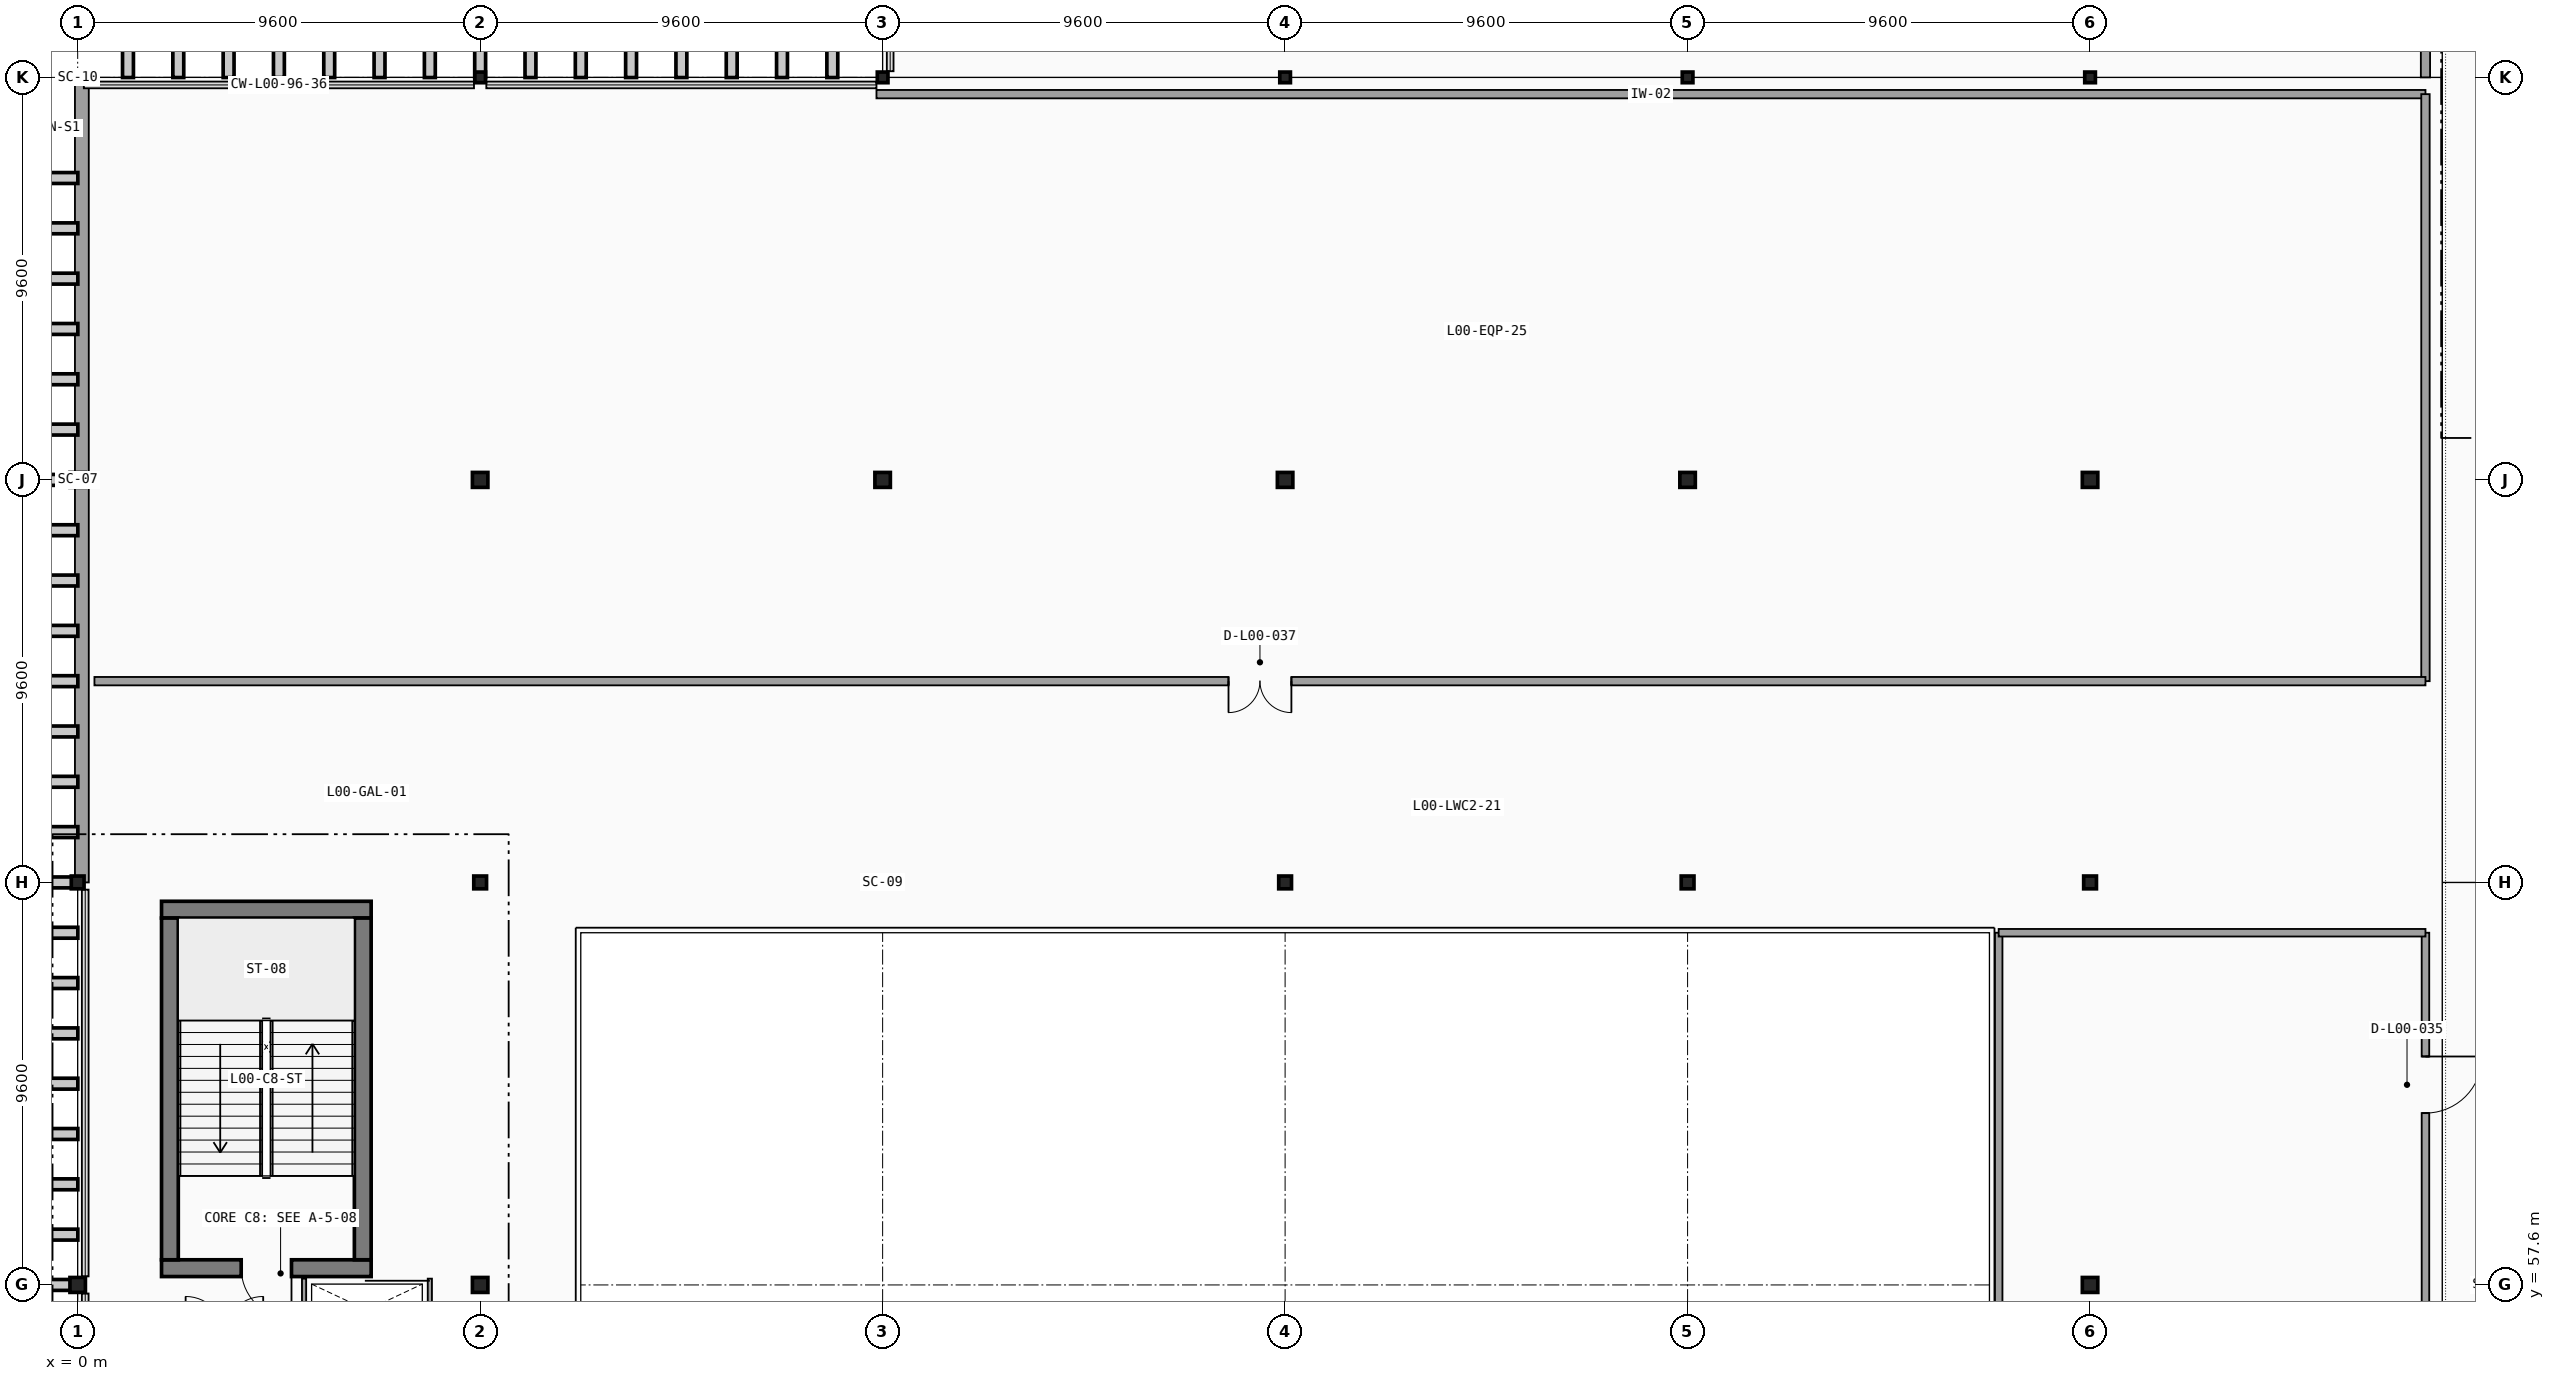
"""IFC4 building model, lengths in metres.
Left out: names, types, materials, properties, quantities, classifications, styles, units other than length and angle.
Written with IfcOpenShell. Run it as: python <this file> out.ifc"""

import sys

from ifc_helpers import new_model, si_unit, direction, frame, frame_2d, origin, origin_2d, place, context, subcontext, project, spatial, rectangle, hollow_rectangle, i_section, extrude, element, fill, save


model = new_model("IFC4")
c1 = context("Model", 3, precision=1e-05, world=origin(), true_north=direction((0.0, 1.0)))
c2 = subcontext(c1, "Body", "Model", "MODEL_VIEW")
j1 = project(units=[si_unit("LENGTHUNIT", "METRE"), si_unit("PLANEANGLEUNIT", "RADIAN")], contexts=[c1])
p1 = place(None, origin())
s1 = spatial("IfcSite", under=j1, at=p1, CompositionType="ELEMENT")
p2 = place(p1, origin())
s2 = spatial("IfcBuilding", under=s1, at=p2, CompositionType="ELEMENT")
p3 = place(p2, origin())
s3 = spatial("IfcBuildingStorey", under=s2, at=p3, CompositionType="ELEMENT", Elevation=0.0)
p4 = place(p3, frame((0.0, 57.6, 0.0), z_axis=(0.0, 0.0, 1.0), x_axis=(1.0, 0.0, 0.0)))
e1 = element("IfcColumn", 1, at=p4, inside=s3, PredefinedType="COLUMN", context=c2, shape_type="SweptSolid", body=[
    extrude(i_section(OverallWidth=0.369, OverallDepth=0.356, WebThickness=0.011, FlangeThickness=0.018, FilletRadius=0.015, at=origin_2d()), origin(), (0.0, 0.0, 1.0), 4.8),
])
p5 = place(p3, frame((0.0, 67.2, 0.0), z_axis=(0.0, 0.0, 1.0), x_axis=(1.0, 0.0, 0.0)))
e2 = element("IfcColumn", 2, at=p5, inside=s3, PredefinedType="COLUMN", context=c2, shape_type="SweptSolid", body=[
    extrude(hollow_rectangle(XDim=0.305, YDim=0.305, WallThickness=0.013, InnerFilletRadius=0.013, OuterFilletRadius=0.025, at=origin_2d()), origin(), (0.0, 0.0, 1.0), 4.8),
])
p6 = place(p3, frame((0.0, 76.8, 0.0), z_axis=(0.0, 0.0, 1.0), x_axis=(1.0, 0.0, 0.0)))
e3 = element("IfcColumn", 3, at=p6, inside=s3, PredefinedType="COLUMN", context=c2, shape_type="SweptSolid", body=[
    extrude(i_section(OverallWidth=0.369, OverallDepth=0.356, WebThickness=0.011, FlangeThickness=0.018, FilletRadius=0.015, at=origin_2d()), origin(), (0.0, 0.0, 1.0), 4.8),
])
p7 = place(p3, frame((0.0, 86.4, 0.0), z_axis=(0.0, 0.0, 1.0), x_axis=(1.0, 0.0, 0.0)))
e4 = element("IfcColumn", 4, at=p7, inside=s3, PredefinedType="COLUMN", context=c2, shape_type="SweptSolid", body=[
    extrude(hollow_rectangle(XDim=0.254, YDim=0.254, WallThickness=0.013, InnerFilletRadius=0.013, OuterFilletRadius=0.025, at=origin_2d()), origin(), (0.0, 0.0, 1.0), 4.8),
])
p8 = place(p3, frame((9.6, 57.6, 0.0), z_axis=(0.0, 0.0, 1.0), x_axis=(1.0, 0.0, 0.0)))
e5 = element("IfcColumn", 5, at=p8, inside=s3, PredefinedType="COLUMN", context=c2, shape_type="SweptSolid", body=[
    extrude(i_section(OverallWidth=0.369, OverallDepth=0.356, WebThickness=0.011, FlangeThickness=0.018, FilletRadius=0.015, at=origin_2d()), origin(), (0.0, 0.0, 1.0), 4.8),
])
p9 = place(p3, frame((9.6, 67.2, 0.0), z_axis=(0.0, 0.0, 1.0), x_axis=(1.0, 0.0, 0.0)))
e6 = element("IfcColumn", 6, at=p9, inside=s3, PredefinedType="COLUMN", context=c2, shape_type="SweptSolid", body=[
    extrude(hollow_rectangle(XDim=0.305, YDim=0.305, WallThickness=0.013, InnerFilletRadius=0.013, OuterFilletRadius=0.025, at=origin_2d()), origin(), (0.0, 0.0, 1.0), 4.8),
])
p10 = place(p3, frame((9.6, 76.8, 0.0), z_axis=(0.0, 0.0, 1.0), x_axis=(1.0, 0.0, 0.0)))
e7 = element("IfcColumn", 7, at=p10, inside=s3, PredefinedType="COLUMN", context=c2, shape_type="SweptSolid", body=[
    extrude(i_section(OverallWidth=0.369, OverallDepth=0.356, WebThickness=0.011, FlangeThickness=0.018, FilletRadius=0.015, at=origin_2d()), origin(), (0.0, 0.0, 1.0), 4.8),
])
p11 = place(p3, frame((9.6, 86.4, 0.0), z_axis=(0.0, 0.0, 1.0), x_axis=(1.0, 0.0, 0.0)))
e8 = element("IfcColumn", 8, at=p11, inside=s3, PredefinedType="COLUMN", context=c2, shape_type="SweptSolid", body=[
    extrude(hollow_rectangle(XDim=0.254, YDim=0.254, WallThickness=0.013, InnerFilletRadius=0.013, OuterFilletRadius=0.025, at=origin_2d()), origin(), (0.0, 0.0, 1.0), 4.8),
])
p12 = place(p3, frame((19.2, 67.2, 0.0), z_axis=(0.0, 0.0, 1.0), x_axis=(1.0, 0.0, 0.0)))
e9 = element("IfcColumn", 9, at=p12, inside=s3, PredefinedType="COLUMN", context=c2, shape_type="SweptSolid", body=[
    extrude(hollow_rectangle(XDim=0.305, YDim=0.305, WallThickness=0.013, InnerFilletRadius=0.013, OuterFilletRadius=0.025, at=origin_2d()), origin(), (0.0, 0.0, 1.0), 4.8),
])
p13 = place(p3, frame((19.2, 76.8, 0.0), z_axis=(0.0, 0.0, 1.0), x_axis=(1.0, 0.0, 0.0)))
e10 = element("IfcColumn", 10, at=p13, inside=s3, PredefinedType="COLUMN", context=c2, shape_type="SweptSolid", body=[
    extrude(i_section(OverallWidth=0.369, OverallDepth=0.356, WebThickness=0.011, FlangeThickness=0.018, FilletRadius=0.015, at=origin_2d()), origin(), (0.0, 0.0, 1.0), 4.8),
])
p14 = place(p3, frame((19.2, 86.4, 0.0), z_axis=(0.0, 0.0, 1.0), x_axis=(1.0, 0.0, 0.0)))
e11 = element("IfcColumn", 11, at=p14, inside=s3, PredefinedType="COLUMN", context=c2, shape_type="SweptSolid", body=[
    extrude(hollow_rectangle(XDim=0.254, YDim=0.254, WallThickness=0.013, InnerFilletRadius=0.013, OuterFilletRadius=0.025, at=origin_2d()), origin(), (0.0, 0.0, 1.0), 4.8),
])
p15 = place(p3, frame((28.8, 67.2, 0.0), z_axis=(0.0, 0.0, 1.0), x_axis=(1.0, 0.0, 0.0)))
e12 = element("IfcColumn", 12, at=p15, inside=s3, PredefinedType="COLUMN", context=c2, shape_type="SweptSolid", body=[
    extrude(hollow_rectangle(XDim=0.305, YDim=0.305, WallThickness=0.013, InnerFilletRadius=0.013, OuterFilletRadius=0.025, at=origin_2d()), origin(), (0.0, 0.0, 1.0), 4.8),
])
p16 = place(p3, frame((28.8, 76.8, 0.0), z_axis=(0.0, 0.0, 1.0), x_axis=(1.0, 0.0, 0.0)))
e13 = element("IfcColumn", 13, at=p16, inside=s3, PredefinedType="COLUMN", context=c2, shape_type="SweptSolid", body=[
    extrude(i_section(OverallWidth=0.369, OverallDepth=0.356, WebThickness=0.011, FlangeThickness=0.018, FilletRadius=0.015, at=origin_2d()), origin(), (0.0, 0.0, 1.0), 4.8),
])
p17 = place(p3, frame((28.8, 86.4, 0.0), z_axis=(0.0, 0.0, 1.0), x_axis=(1.0, 0.0, 0.0)))
e14 = element("IfcColumn", 14, at=p17, inside=s3, PredefinedType="COLUMN", context=c2, shape_type="SweptSolid", body=[
    extrude(hollow_rectangle(XDim=0.254, YDim=0.254, WallThickness=0.013, InnerFilletRadius=0.013, OuterFilletRadius=0.025, at=origin_2d()), origin(), (0.0, 0.0, 1.0), 4.8),
])
p18 = place(p3, frame((38.4, 67.2, 0.0), z_axis=(0.0, 0.0, 1.0), x_axis=(1.0, 0.0, 0.0)))
e15 = element("IfcColumn", 15, at=p18, inside=s3, PredefinedType="COLUMN", context=c2, shape_type="SweptSolid", body=[
    extrude(hollow_rectangle(XDim=0.305, YDim=0.305, WallThickness=0.013, InnerFilletRadius=0.013, OuterFilletRadius=0.025, at=origin_2d()), origin(), (0.0, 0.0, 1.0), 4.8),
])
p19 = place(p3, frame((38.4, 76.8, 0.0), z_axis=(0.0, 0.0, 1.0), x_axis=(1.0, 0.0, 0.0)))
e16 = element("IfcColumn", 16, at=p19, inside=s3, PredefinedType="COLUMN", context=c2, shape_type="SweptSolid", body=[
    extrude(i_section(OverallWidth=0.369, OverallDepth=0.356, WebThickness=0.011, FlangeThickness=0.018, FilletRadius=0.015, at=origin_2d()), origin(), (0.0, 0.0, 1.0), 4.8),
])
p20 = place(p3, frame((38.4, 86.4, 0.0), z_axis=(0.0, 0.0, 1.0), x_axis=(1.0, 0.0, 0.0)))
e17 = element("IfcColumn", 17, at=p20, inside=s3, PredefinedType="COLUMN", context=c2, shape_type="SweptSolid", body=[
    extrude(hollow_rectangle(XDim=0.254, YDim=0.254, WallThickness=0.013, InnerFilletRadius=0.013, OuterFilletRadius=0.025, at=origin_2d()), origin(), (0.0, 0.0, 1.0), 4.8),
])
p21 = place(p3, frame((48.0, 57.6, 0.0), z_axis=(0.0, 0.0, 1.0), x_axis=(1.0, 0.0, 0.0)))
e18 = element("IfcColumn", 18, at=p21, inside=s3, PredefinedType="COLUMN", context=c2, shape_type="SweptSolid", body=[
    extrude(i_section(OverallWidth=0.369, OverallDepth=0.356, WebThickness=0.011, FlangeThickness=0.018, FilletRadius=0.015, at=origin_2d()), origin(), (0.0, 0.0, 1.0), 4.8),
])
p22 = place(p3, frame((48.0, 67.2, 0.0), z_axis=(0.0, 0.0, 1.0), x_axis=(1.0, 0.0, 0.0)))
e19 = element("IfcColumn", 19, at=p22, inside=s3, PredefinedType="COLUMN", context=c2, shape_type="SweptSolid", body=[
    extrude(hollow_rectangle(XDim=0.305, YDim=0.305, WallThickness=0.013, InnerFilletRadius=0.013, OuterFilletRadius=0.025, at=origin_2d()), origin(), (0.0, 0.0, 1.0), 4.8),
])
p23 = place(p3, frame((48.0, 76.8, 0.0), z_axis=(0.0, 0.0, 1.0), x_axis=(1.0, 0.0, 0.0)))
e20 = element("IfcColumn", 20, at=p23, inside=s3, PredefinedType="COLUMN", context=c2, shape_type="SweptSolid", body=[
    extrude(i_section(OverallWidth=0.369, OverallDepth=0.356, WebThickness=0.011, FlangeThickness=0.018, FilletRadius=0.015, at=origin_2d()), origin(), (0.0, 0.0, 1.0), 4.8),
])
p24 = place(p3, frame((48.0, 86.4, 0.0), z_axis=(0.0, 0.0, 1.0), x_axis=(1.0, 0.0, 0.0)))
e21 = element("IfcColumn", 21, at=p24, inside=s3, PredefinedType="COLUMN", context=c2, shape_type="SweptSolid", body=[
    extrude(hollow_rectangle(XDim=0.254, YDim=0.254, WallThickness=0.013, InnerFilletRadius=0.013, OuterFilletRadius=0.025, at=origin_2d()), origin(), (0.0, 0.0, 1.0), 4.8),
])
p25 = place(p3, frame((0.1, 86.4, 0.0), z_axis=(0.0, 0.0, 1.0), x_axis=(0.0, -1.0, 0.0)))
e22 = element("IfcWall", 22, at=p25, inside=s3, PredefinedType="SOLIDWALL", context=c2, shape_type="SweptSolid", body=[
    extrude(rectangle(XDim=9.6, YDim=0.33, at=frame_2d((4.8, 0.0))), origin(), (0.0, 0.0, 1.0), 3.573),
])
p26 = place(p3, frame((0.1, 76.8, 0.0), z_axis=(0.0, 0.0, 1.0), x_axis=(0.0, -1.0, 0.0)))
e23 = element("IfcWall", 23, at=p26, inside=s3, PredefinedType="SOLIDWALL", context=c2, shape_type="SweptSolid", body=[
    extrude(rectangle(XDim=9.6, YDim=0.33, at=frame_2d((4.8, 0.0))), origin(), (0.0, 0.0, 1.0), 3.573),
])
p27 = place(p3, frame((2.0, 58.0, 0.0), z_axis=(0.0, 0.0, 1.0), x_axis=(1.0, 0.0, 0.0)))
e24 = element("IfcWall", 24, at=p27, inside=s3, PredefinedType="SHEAR", context=c2, shape_type="SweptSolid", body=[
    extrude(rectangle(XDim=5.0, YDim=0.4, at=frame_2d((2.5, 0.0))), origin(), (0.0, 0.0, 1.0), 4.5),
])
p28 = place(p27, frame((3.1, 0.0, 0.0), z_axis=(0.0, 0.0, 1.0), x_axis=(-1.0, 0.0, 0.0)))
e25 = element("IfcOpeningElement", 25, at=p28, cuts=e24, PredefinedType="OPENING", context=c2, shape_type="SweptSolid", body=[
    extrude(rectangle(XDim=1.2, YDim=2.2, at=frame_2d((0.6, 1.1))), frame((0.0, 0.21, 0.0), z_axis=(0.0, -1.0, 0.0), x_axis=(1.0, 0.0, 0.0)), (0.0, 0.0, 1.0), 0.42),
])
p29 = place(p3, frame((7.0, 66.55, 0.0), z_axis=(0.0, 0.0, 1.0), x_axis=(-1.0, 0.0, 0.0)))
e26 = element("IfcWall", 26, at=p29, inside=s3, PredefinedType="SHEAR", context=c2, shape_type="SweptSolid", body=[
    extrude(rectangle(XDim=5.0, YDim=0.4, at=frame_2d((2.5, 0.0))), origin(), (0.0, 0.0, 1.0), 4.5),
])
for number, where, z_axis, x_axis in (
    (27, (2.2, 66.35, 0.0), (0.0, 0.0, 1.0), (0.0, -1.0, 0.0)),
    (28, (6.8, 58.2, 0.0), (0.0, 0.0, 1.0), (0.0, 1.0, 0.0)),
):
    element("IfcWall", number, at=place(p3, frame(where, z_axis=z_axis, x_axis=x_axis)), inside=s3, PredefinedType="SHEAR", context=c2, shape_type="SweptSolid", body=[
        extrude(rectangle(XDim=8.15, YDim=0.4, at=frame_2d((4.075, 0.0))), origin(), (0.0, 0.0, 1.0), 4.5),
    ])
for number, where, z_axis, x_axis in (
    (29, (5.4, 57.75, 0.0), (0.0, 0.0, 1.0), (0.0, -1.0, 0.0)),
    (30, (8.4, 56.25, 0.0), (0.0, 0.0, 1.0), (0.0, 1.0, 0.0)),
):
    element("IfcWall", number, at=place(p3, frame(where, z_axis=z_axis, x_axis=x_axis)), inside=s3, PredefinedType="PARTITIONING", context=c2, shape_type="SweptSolid", body=[
        extrude(rectangle(XDim=1.5, YDim=0.1, at=frame_2d((0.75, 0.0))), origin(), (0.0, 0.0, 1.0), 4.5),
    ])
p30 = place(p3, frame((56.0, 66.0, 0.0), z_axis=(0.0, 0.0, 1.0), x_axis=(0.0, -1.0, 0.0)))
e31 = element("IfcWall", 31, at=p30, inside=s3, PredefinedType="PARTITIONING", context=c2, shape_type="SweptSolid", body=[
    extrude(rectangle(XDim=27.4, YDim=0.18, at=frame_2d((13.7, 0.0))), origin(), (0.0, 0.0, 1.0), 3.664),
])
p31 = place(p30, frame((2.952, 0.0, 0.0), z_axis=(0.0, 0.0, 1.0), x_axis=(1.0, 0.0, 0.0)))
e32 = element("IfcOpeningElement", 32, at=p31, cuts=e31, PredefinedType="OPENING", context=c2, shape_type="SweptSolid", body=[
    extrude(rectangle(XDim=1.35, YDim=2.25, at=frame_2d((0.675, 1.125))), frame((0.0, 0.1, 0.0), z_axis=(0.0, -1.0, 0.0), x_axis=(1.0, 0.0, 0.0)), (0.0, 0.0, 1.0), 0.2),
])
p32 = place(p3, frame((45.82, 38.6, 0.0), z_axis=(0.0, 0.0, 1.0), x_axis=(0.0, 1.0, 0.0)))
e33 = element("IfcWall", 33, at=p32, inside=s3, PredefinedType="PARTITIONING", context=c2, shape_type="SweptSolid", body=[
    extrude(rectangle(XDim=27.4, YDim=0.18, at=frame_2d((13.7, 0.0))), origin(), (0.0, 0.0, 1.0), 4.5),
])
p33 = place(p3, frame((45.82, 66.0, 0.0), z_axis=(0.0, 0.0, 1.0), x_axis=(1.0, 0.0, 0.0)))
e34 = element("IfcWall", 34, at=p33, inside=s3, PredefinedType="PARTITIONING", context=c2, shape_type="SweptSolid", body=[
    extrude(rectangle(XDim=10.18, YDim=0.18, at=frame_2d((5.09, 0.0))), origin(), (0.0, 0.0, 1.0), 3.738),
])
p34 = place(p3, frame((19.053, 86.0, 0.0), z_axis=(0.0, 0.0, 1.0), x_axis=(1.0, 0.0, 0.0)))
e35 = element("IfcWall", 35, at=p34, inside=s3, PredefinedType="PARTITIONING", context=c2, shape_type="SweptSolid", body=[
    extrude(rectangle(XDim=36.947, YDim=0.2, at=frame_2d((18.474, 0.0))), origin(), (0.0, 0.0, 1.0), 3.738),
])
p35 = place(p3, frame((56.0, 86.0, 0.0), z_axis=(0.0, 0.0, 1.0), x_axis=(0.0, -1.0, 0.0)))
e36 = element("IfcWall", 36, at=p35, inside=s3, PredefinedType="PARTITIONING", context=c2, shape_type="SweptSolid", body=[
    extrude(rectangle(XDim=14.0, YDim=0.2, at=frame_2d((7.0, 0.0))), origin(), (0.0, 0.0, 1.0), 3.664),
])
p36 = place(p3, frame((56.0, 72.0, 0.0), z_axis=(0.0, 0.0, 1.0), x_axis=(-1.0, 0.0, 0.0)))
e37 = element("IfcWall", 37, at=p36, inside=s3, PredefinedType="PARTITIONING", context=c2, shape_type="SweptSolid", body=[
    extrude(rectangle(XDim=55.6, YDim=0.2, at=frame_2d((27.8, 0.0))), origin(), (0.0, 0.0, 1.0), 3.738),
])
p37 = place(p36, frame((27.05, 0.0, 0.0), z_axis=(0.0, 0.0, 1.0), x_axis=(1.0, 0.0, 0.0)))
e38 = element("IfcOpeningElement", 38, at=p37, cuts=e37, PredefinedType="OPENING", context=c2, shape_type="SweptSolid", body=[
    extrude(rectangle(XDim=1.5, YDim=2.25, at=frame_2d((0.75, 1.125))), frame((0.0, 0.11, 0.0), z_axis=(0.0, -1.0, 0.0), x_axis=(1.0, 0.0, 0.0)), (0.0, 0.0, 1.0), 0.22),
])
p38 = place(p3, frame((56.0, 105.2, 0.0), z_axis=(0.0, 0.0, 1.0), x_axis=(0.0, -1.0, 0.0)))
e39 = element("IfcWall", 39, at=p38, inside=s3, PredefinedType="PARTITIONING", context=c2, shape_type="SweptSolid", body=[
    extrude(rectangle(XDim=18.8, YDim=0.22, at=frame_2d((9.4, 0.0))), origin(), (0.0, 0.0, 1.0), 3.664),
])
p39 = place(p38, frame((13.025, 0.0, 0.0), z_axis=(0.0, 0.0, 1.0), x_axis=(1.0, 0.0, 0.0)))
e40 = element("IfcOpeningElement", 40, at=p39, cuts=e39, PredefinedType="OPENING", context=c2, shape_type="SweptSolid", body=[
    extrude(rectangle(XDim=1.95, YDim=2.35, at=frame_2d((0.975, 1.175))), frame((0.0, 0.12, 0.0), z_axis=(0.0, -1.0, 0.0), x_axis=(1.0, 0.0, 0.0)), (0.0, 0.0, 1.0), 0.24),
])
p40 = place(p28, origin())
e41 = element("IfcDoor", 41, at=p40, inside=s3, OperationType="SINGLE_SWING_LEFT", PredefinedType="DOOR", context=c2, shape_type="SweptSolid", body=[
    extrude(rectangle(XDim=1.2, YDim=2.2, at=frame_2d((0.6, 1.1))), frame((0.0, 0.025, 0.0), z_axis=(0.0, -1.0, 0.0), x_axis=(1.0, 0.0, 0.0)), (0.0, 0.0, 1.0), 0.05),
])
fill(e25, e41)
p41 = place(p31, origin())
e42 = element("IfcDoor", 42, at=p41, inside=s3, OperationType="SINGLE_SWING_LEFT", PredefinedType="DOOR", context=c2, shape_type="SweptSolid", body=[
    extrude(rectangle(XDim=1.35, YDim=2.25, at=frame_2d((0.675, 1.125))), frame((0.0, 0.025, 0.0), z_axis=(0.0, -1.0, 0.0), x_axis=(1.0, 0.0, 0.0)), (0.0, 0.0, 1.0), 0.05),
])
fill(e32, e42)
p42 = place(p37, origin())
e43 = element("IfcDoor", 43, at=p42, inside=s3, OperationType="DOUBLE_DOOR_SINGLE_SWING", PredefinedType="DOOR", context=c2, shape_type="SweptSolid", body=[
    extrude(rectangle(XDim=1.5, YDim=2.25, at=frame_2d((0.75, 1.125))), frame((0.0, 0.025, 0.0), z_axis=(0.0, -1.0, 0.0), x_axis=(1.0, 0.0, 0.0)), (0.0, 0.0, 1.0), 0.05),
])
fill(e38, e43)
save(model, sys.argv[1])
